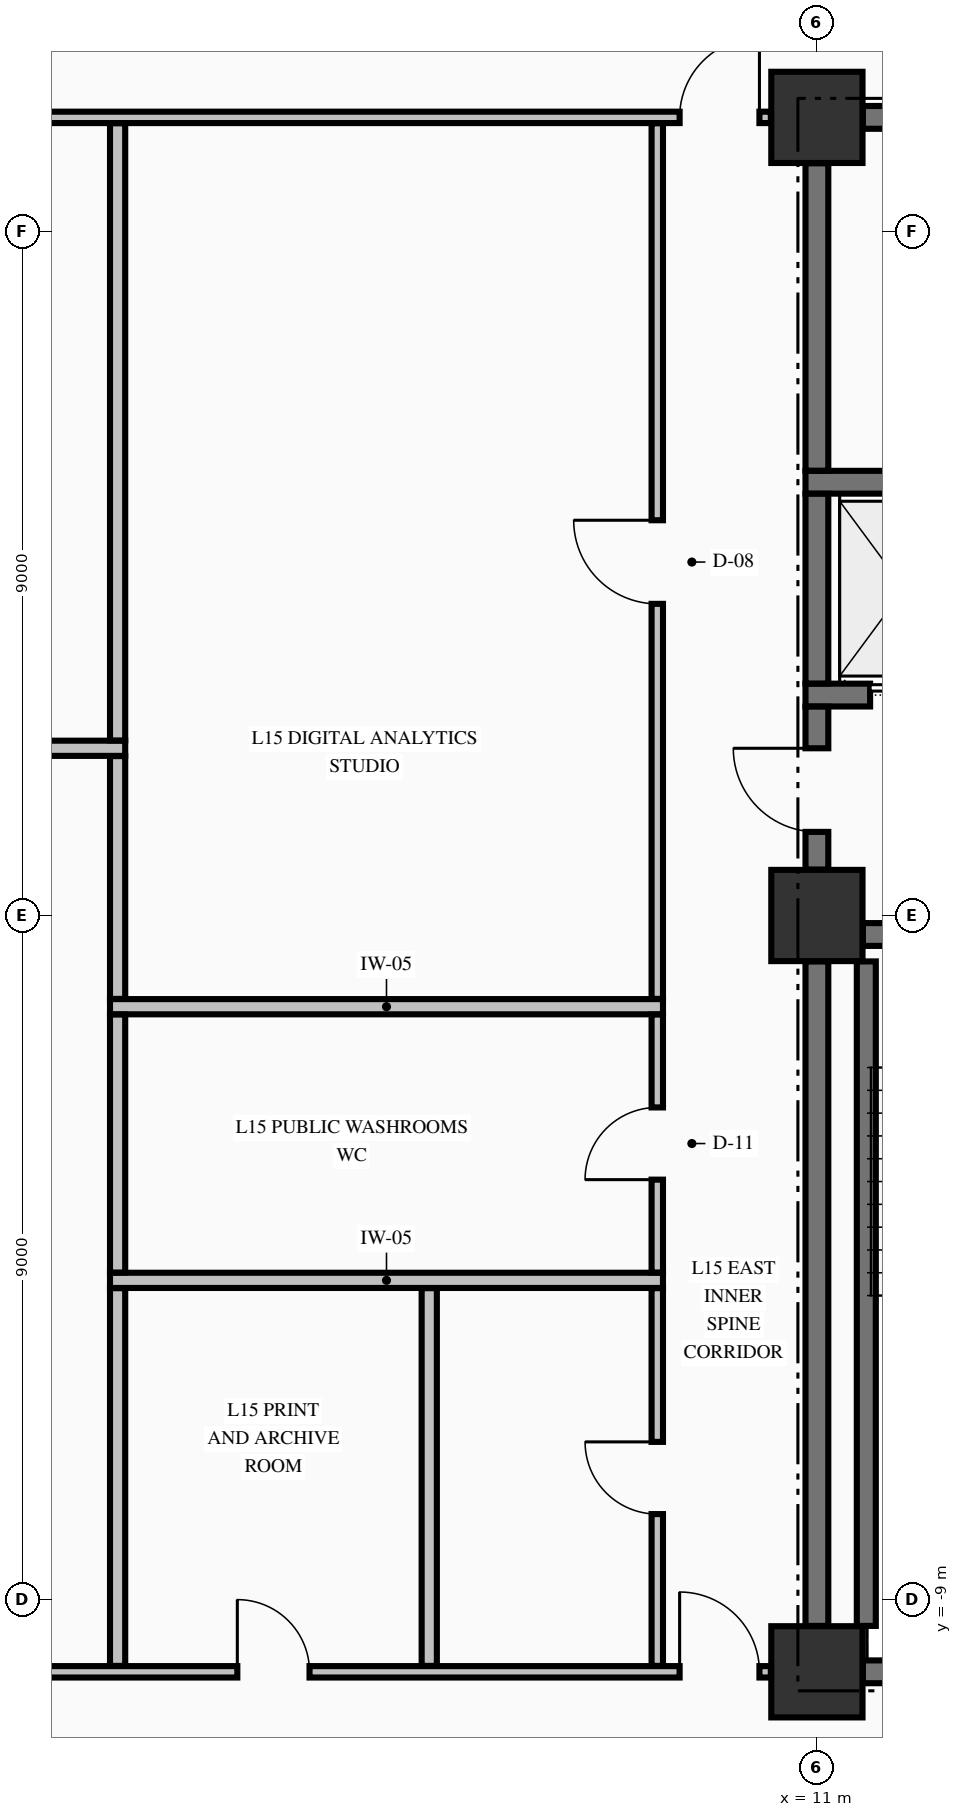
"""IFC4 building model, lengths in metres.
Left out: names, types, materials, properties, quantities, classifications, styles, units other than length and angle.
Written with IfcOpenShell. Run it as: python <this file> out.ifc"""

import sys

from ifc_helpers import new_model, si_unit, direction, frame, frame_2d, origin, origin_2d, place, context, subcontext, project, spatial, rectangle, extrude, element, fill, save


model = new_model("IFC4")
c1 = context("Model", 3, precision=1e-05, world=origin(), true_north=direction((0.0, 1.0)))
c2 = subcontext(c1, "Body", "Model", "MODEL_VIEW")
j1 = project(units=[si_unit("LENGTHUNIT", "METRE"), si_unit("PLANEANGLEUNIT", "RADIAN")], contexts=[c1])
p1 = place(None, origin())
s1 = spatial("IfcSite", under=j1, at=p1, CompositionType="ELEMENT")
p2 = place(p1, origin())
s2 = spatial("IfcBuilding", under=s1, at=p2, CompositionType="ELEMENT")
p3 = place(p2, frame((0.0, 0.0, 64.33)))
s3 = spatial("IfcBuildingStorey", under=s2, at=p3, CompositionType="ELEMENT", Elevation=64.33)
for number, where, z_axis, x_axis in (
    (1, (11.0, -9.95, -0.25), (0.0, 0.0, 1.0), (1.0, 0.0, 0.0)),
    (2, (11.0, 0.0, -0.25), (0.0, 0.0, 1.0), (1.0, 0.0, 0.0)),
    (3, (11.0, 10.5, -0.25), (0.0, 0.0, 1.0), (1.0, 0.0, 0.0)),
):
    element("IfcColumn", number, at=place(p3, frame(where, z_axis=z_axis, x_axis=x_axis)), inside=s3, PredefinedType="COLUMN", context=c2, shape_type="SweptSolid", body=[
        extrude(rectangle(XDim=1.2, YDim=1.2, at=origin_2d()), origin(), (0.0, 0.0, 1.0), 3.57),
    ])
p4 = place(p3, frame((11.604, -9.95, 0.0), z_axis=(0.0, 0.0, 1.0), x_axis=(1.0, 0.0, 0.0)))
e4 = element("IfcWall", 4, at=p4, inside=s3, PredefinedType="SHEAR", context=c2, shape_type="SweptSolid", body=[
    extrude(rectangle(XDim=3.096, YDim=0.3, at=frame_2d((1.548, 0.0))), origin(), (0.0, 0.0, 1.0), 3.32),
])
p5 = place(p3, frame((11.604, -0.25, 0.0), z_axis=(0.0, 0.0, 1.0), x_axis=(1.0, 0.0, 0.0)))
e5 = element("IfcWall", 5, at=p5, inside=s3, PredefinedType="SHEAR", context=c2, shape_type="SweptSolid", body=[
    extrude(rectangle(XDim=3.271, YDim=0.3, at=frame_2d((1.635, 0.0))), origin(), (0.0, 0.0, 1.0), 3.32),
])
p6 = place(p5, frame((0.996, 0.0, 0.0)))
e6 = element("IfcOpeningElement", 6, at=p6, cuts=e5, PredefinedType="OPENING", context=c2, shape_type="SweptSolid", body=[
    extrude(rectangle(XDim=1.1, YDim=2.15, at=frame_2d((0.55, 1.075))), frame((0.0, 0.16, 0.0), z_axis=(0.0, -1.0, 0.0), x_axis=(1.0, 0.0, 0.0)), (0.0, 0.0, 1.0), 0.32),
])
p7 = place(p3, frame((10.85, 2.9, 0.0), z_axis=(0.0, 0.0, 1.0), x_axis=(1.0, 0.0, 0.0)))
e7 = element("IfcWall", 7, at=p7, inside=s3, PredefinedType="SHEAR", context=c2, shape_type="SweptSolid", body=[
    extrude(rectangle(XDim=4.025, YDim=0.3, at=frame_2d((2.012, 0.0))), origin(), (0.0, 0.0, 1.0), 3.32),
])
p8 = place(p7, frame((0.85, 0.0, 0.0)))
e8 = element("IfcOpeningElement", 8, at=p8, cuts=e7, PredefinedType="OPENING", context=c2, shape_type="SweptSolid", body=[
    extrude(rectangle(XDim=1.1, YDim=2.2, at=frame_2d((0.55, 1.1))), frame((0.0, 0.16, 0.0), z_axis=(0.0, -1.0, 0.0), x_axis=(1.0, 0.0, 0.0)), (0.0, 0.0, 1.0), 0.32),
])
p9 = place(p3, frame((10.85, 5.7, 0.0), z_axis=(0.0, 0.0, 1.0), x_axis=(1.0, 0.0, 0.0)))
e9 = element("IfcWall", 9, at=p9, inside=s3, PredefinedType="SHEAR", context=c2, shape_type="SweptSolid", body=[
    extrude(rectangle(XDim=4.025, YDim=0.3, at=frame_2d((2.012, 0.0))), origin(), (0.0, 0.0, 1.0), 3.32),
])
p10 = place(p3, frame((11.604, 10.5, 0.0), z_axis=(0.0, 0.0, 1.0), x_axis=(1.0, 0.0, 0.0)))
e10 = element("IfcWall", 10, at=p10, inside=s3, PredefinedType="SHEAR", context=c2, shape_type="SweptSolid", body=[
    extrude(rectangle(XDim=3.096, YDim=0.3, at=frame_2d((1.548, 0.0))), origin(), (0.0, 0.0, 1.0), 3.32),
])
p11 = place(p10, frame((1.371, 0.0, 0.0)))
e11 = element("IfcOpeningElement", 11, at=p11, cuts=e10, PredefinedType="OPENING", context=c2, shape_type="SweptSolid", body=[
    extrude(rectangle(XDim=0.95, YDim=2.15, at=frame_2d((0.475, 1.075))), frame((0.0, 0.16, 0.0), z_axis=(0.0, -1.0, 0.0), x_axis=(1.0, 0.0, 0.0)), (0.0, 0.0, 1.0), 0.32),
])
p12 = place(p3, frame((-10.394, -9.95, 0.0), z_axis=(0.0, 0.0, 1.0), x_axis=(1.0, 0.0, 0.0)))
e12 = element("IfcWall", 12, at=p12, inside=s3, PredefinedType="PARTITIONING", context=c2, shape_type="SweptSolid", body=[
    extrude(rectangle(XDim=20.788, YDim=0.15, at=frame_2d((10.394, 0.0))), origin(), (0.0, 0.0, 1.0), 3.32),
])
p13 = place(p12, frame((0.15, 0.0, 0.0)))
e13 = element("IfcOpeningElement", 13, at=p13, cuts=e12, PredefinedType="OPENING", context=c2, shape_type="SweptSolid", body=[
    extrude(rectangle(XDim=1.05, YDim=2.15, at=frame_2d((0.525, 1.075))), frame((0.0, 0.085, 0.0), z_axis=(0.0, -1.0, 0.0), x_axis=(1.0, 0.0, 0.0)), (0.0, 0.0, 1.0), 0.17),
])
p14 = place(p12, frame((19.588, 0.0, 0.0)))
e14 = element("IfcOpeningElement", 14, at=p14, cuts=e12, PredefinedType="OPENING", context=c2, shape_type="SweptSolid", body=[
    extrude(rectangle(XDim=1.05, YDim=2.15, at=frame_2d((0.525, 1.075))), frame((0.0, 0.085, 0.0), z_axis=(0.0, -1.0, 0.0), x_axis=(1.0, 0.0, 0.0)), (0.0, 0.0, 1.0), 0.17),
])
p15 = place(p12, frame((13.769, 0.0, 0.0)))
e15 = element("IfcOpeningElement", 15, at=p15, cuts=e12, PredefinedType="OPENING", context=c2, shape_type="SweptSolid", body=[
    extrude(rectangle(XDim=0.95, YDim=2.15, at=frame_2d((0.475, 1.075))), frame((0.0, 0.085, 0.0), z_axis=(0.0, -1.0, 0.0), x_axis=(1.0, 0.0, 0.0)), (0.0, 0.0, 1.0), 0.17),
])
for number, where, z_axis, x_axis in (
    (16, (1.7, -4.8, 0.0), (0.0, 0.0, 1.0), (1.0, 0.0, 0.0)),
    (17, (1.7, -1.2, 0.0), (0.0, 0.0, 1.0), (1.0, 0.0, 0.0)),
):
    element("IfcWall", number, at=place(p3, frame(where, z_axis=z_axis, x_axis=x_axis)), inside=s3, PredefinedType="PARTITIONING", context=c2, shape_type="SweptSolid", body=[
        extrude(rectangle(XDim=7.275, YDim=0.2, at=frame_2d((3.638, 0.0))), origin(), (0.0, 0.0, 1.0), 3.32),
    ])
p16 = place(p3, frame((-8.975, 2.2, 0.0), z_axis=(0.0, 0.0, 1.0), x_axis=(1.0, 0.0, 0.0)))
e18 = element("IfcWall", 18, at=p16, inside=s3, PredefinedType="PARTITIONING", context=c2, shape_type="SweptSolid", body=[
    extrude(rectangle(XDim=10.875, YDim=0.2, at=frame_2d((5.438, 0.0))), origin(), (0.0, 0.0, 1.0), 3.32),
])
p17 = place(p3, frame((-10.394, 10.5, 0.0), z_axis=(0.0, 0.0, 1.0), x_axis=(1.0, 0.0, 0.0)))
e19 = element("IfcWall", 19, at=p17, inside=s3, PredefinedType="PARTITIONING", context=c2, shape_type="SweptSolid", body=[
    extrude(rectangle(XDim=20.788, YDim=0.15, at=frame_2d((10.394, 0.0))), origin(), (0.0, 0.0, 1.0), 3.32),
])
p18 = place(p17, frame((0.15, 0.0, 0.0)))
e20 = element("IfcOpeningElement", 20, at=p18, cuts=e19, PredefinedType="OPENING", context=c2, shape_type="SweptSolid", body=[
    extrude(rectangle(XDim=1.05, YDim=2.15, at=frame_2d((0.525, 1.075))), frame((0.0, 0.085, 0.0), z_axis=(0.0, -1.0, 0.0), x_axis=(1.0, 0.0, 0.0)), (0.0, 0.0, 1.0), 0.17),
])
p19 = place(p17, frame((19.588, 0.0, 0.0)))
e21 = element("IfcOpeningElement", 21, at=p19, cuts=e19, PredefinedType="OPENING", context=c2, shape_type="SweptSolid", body=[
    extrude(rectangle(XDim=1.05, YDim=2.15, at=frame_2d((0.525, 1.075))), frame((0.0, 0.085, 0.0), z_axis=(0.0, -1.0, 0.0), x_axis=(1.0, 0.0, 0.0)), (0.0, 0.0, 1.0), 0.17),
])
p20 = place(p3, frame((11.0, -9.346, 0.0), z_axis=(0.0, 0.0, 1.0), x_axis=(0.0, 1.0, 0.0)))
e22 = element("IfcWall", 22, at=p20, inside=s3, PredefinedType="SHEAR", context=c2, shape_type="SweptSolid", body=[
    extrude(rectangle(XDim=8.742, YDim=0.3, at=frame_2d((4.371, 0.0))), origin(), (0.0, 0.0, 1.0), 3.32),
])
p21 = place(p3, frame((11.0, 0.604, 0.0), z_axis=(0.0, 0.0, 1.0), x_axis=(0.0, 1.0, 0.0)))
e23 = element("IfcWall", 23, at=p21, inside=s3, PredefinedType="SHEAR", context=c2, shape_type="SweptSolid", body=[
    extrude(rectangle(XDim=2.144, YDim=0.3, at=frame_2d((1.072, 0.0))), origin(), (0.0, 0.0, 1.0), 3.32),
])
p22 = place(p21, frame((0.496, 0.0, 0.0)))
e24 = element("IfcOpeningElement", 24, at=p22, cuts=e23, PredefinedType="OPENING", context=c2, shape_type="SweptSolid", body=[
    extrude(rectangle(XDim=1.1, YDim=2.15, at=frame_2d((0.55, 1.075))), frame((0.0, 0.16, 0.0), z_axis=(0.0, -1.0, 0.0), x_axis=(1.0, 0.0, 0.0)), (0.0, 0.0, 1.0), 0.32),
])
p23 = place(p3, frame((11.0, 3.052, 0.0), z_axis=(0.0, 0.0, 1.0), x_axis=(0.0, 1.0, 0.0)))
e25 = element("IfcWall", 25, at=p23, inside=s3, PredefinedType="SHEAR", context=c2, shape_type="SweptSolid", body=[
    extrude(rectangle(XDim=2.496, YDim=0.3, at=frame_2d((1.248, 0.0))), origin(), (0.0, 0.0, 1.0), 3.32),
])
p24 = place(p3, frame((11.0, 5.852, 0.0), z_axis=(0.0, 0.0, 1.0), x_axis=(0.0, 1.0, 0.0)))
e26 = element("IfcWall", 26, at=p24, inside=s3, PredefinedType="SHEAR", context=c2, shape_type="SweptSolid", body=[
    extrude(rectangle(XDim=4.044, YDim=0.3, at=frame_2d((2.022, 0.0))), origin(), (0.0, 0.0, 1.0), 3.32),
])
p25 = place(p3, frame((11.65, -9.346, 0.0), z_axis=(0.0, 0.0, 1.0), x_axis=(0.0, 1.0, 0.0)))
e27 = element("IfcWall", 27, at=p25, inside=s3, PredefinedType="SOLIDWALL", context=c2, shape_type="SweptSolid", body=[
    extrude(rectangle(XDim=8.742, YDim=0.25, at=frame_2d((4.371, 0.0))), origin(), (0.0, 0.0, 1.0), 3.32),
])
p26 = place(p3, frame((1.8, -9.872, 0.0), z_axis=(0.0, 0.0, 1.0), x_axis=(0.0, 1.0, 0.0)))
e28 = element("IfcWall", 28, at=p26, inside=s3, PredefinedType="PARTITIONING", context=c2, shape_type="SweptSolid", body=[
    extrude(rectangle(XDim=4.969, YDim=0.2, at=frame_2d((2.484, 0.0))), origin(), (0.0, 0.0, 1.0), 3.32),
])
p27 = place(p3, frame((1.8, -4.697, 0.0), z_axis=(0.0, 0.0, 1.0), x_axis=(0.0, 1.0, 0.0)))
e29 = element("IfcWall", 29, at=p27, inside=s3, PredefinedType="PARTITIONING", context=c2, shape_type="SweptSolid", body=[
    extrude(rectangle(XDim=3.394, YDim=0.2, at=frame_2d((1.697, 0.0))), origin(), (0.0, 0.0, 1.0), 3.32),
])
p28 = place(p3, frame((1.8, -1.097, 0.0), z_axis=(0.0, 0.0, 1.0), x_axis=(0.0, 1.0, 0.0)))
e30 = element("IfcWall", 30, at=p28, inside=s3, PredefinedType="PARTITIONING", context=c2, shape_type="SweptSolid", body=[
    extrude(rectangle(XDim=3.194, YDim=0.2, at=frame_2d((1.597, 0.0))), origin(), (0.0, 0.0, 1.0), 3.32),
])
p29 = place(p3, frame((1.8, 2.303, 0.0), z_axis=(0.0, 0.0, 1.0), x_axis=(0.0, 1.0, 0.0)))
e31 = element("IfcWall", 31, at=p29, inside=s3, PredefinedType="PARTITIONING", context=c2, shape_type="SweptSolid", body=[
    extrude(rectangle(XDim=8.119, YDim=0.2, at=frame_2d((4.06, 0.0))), origin(), (0.0, 0.0, 1.0), 3.32),
])
p30 = place(p3, frame((5.9, -9.872, 0.0), z_axis=(0.0, 0.0, 1.0), x_axis=(0.0, 1.0, 0.0)))
e32 = element("IfcWall", 32, at=p30, inside=s3, PredefinedType="PARTITIONING", context=c2, shape_type="SweptSolid", body=[
    extrude(rectangle(XDim=4.969, YDim=0.2, at=frame_2d((2.484, 0.0))), origin(), (0.0, 0.0, 1.0), 3.32),
])
p31 = place(p3, frame((8.9, -9.872, 0.0), z_axis=(0.0, 0.0, 1.0), x_axis=(0.0, 1.0, 0.0)))
e33 = element("IfcWall", 33, at=p31, inside=s3, PredefinedType="PARTITIONING", context=c2, shape_type="SweptSolid", body=[
    extrude(rectangle(XDim=4.969, YDim=0.15, at=frame_2d((2.484, 0.0))), origin(), (0.0, 0.0, 1.0), 3.32),
])
p32 = place(p31, frame((1.997, 0.0, 0.0)))
e34 = element("IfcOpeningElement", 34, at=p32, cuts=e33, PredefinedType="OPENING", context=c2, shape_type="SweptSolid", body=[
    extrude(rectangle(XDim=0.95, YDim=2.15, at=frame_2d((0.475, 1.075))), frame((0.0, 0.085, 0.0), z_axis=(0.0, -1.0, 0.0), x_axis=(1.0, 0.0, 0.0)), (0.0, 0.0, 1.0), 0.17),
])
p33 = place(p3, frame((8.9, -4.697, 0.0), z_axis=(0.0, 0.0, 1.0), x_axis=(0.0, 1.0, 0.0)))
e35 = element("IfcWall", 35, at=p33, inside=s3, PredefinedType="PARTITIONING", context=c2, shape_type="SweptSolid", body=[
    extrude(rectangle(XDim=3.394, YDim=0.15, at=frame_2d((1.697, 0.0))), origin(), (0.0, 0.0, 1.0), 3.32),
])
p34 = place(p33, frame((1.222, 0.0, 0.0)))
e36 = element("IfcOpeningElement", 36, at=p34, cuts=e35, PredefinedType="OPENING", context=c2, shape_type="SweptSolid", body=[
    extrude(rectangle(XDim=0.95, YDim=2.15, at=frame_2d((0.475, 1.075))), frame((0.0, 0.085, 0.0), z_axis=(0.0, -1.0, 0.0), x_axis=(1.0, 0.0, 0.0)), (0.0, 0.0, 1.0), 0.17),
])
p35 = place(p3, frame((8.9, -1.097, 0.0), z_axis=(0.0, 0.0, 1.0), x_axis=(0.0, 1.0, 0.0)))
e37 = element("IfcWall", 37, at=p35, inside=s3, PredefinedType="PARTITIONING", context=c2, shape_type="SweptSolid", body=[
    extrude(rectangle(XDim=11.519, YDim=0.15, at=frame_2d((5.76, 0.0))), origin(), (0.0, 0.0, 1.0), 3.32),
])
p36 = place(p35, frame((5.197, 0.0, 0.0)))
e38 = element("IfcOpeningElement", 38, at=p36, cuts=e37, PredefinedType="OPENING", context=c2, shape_type="SweptSolid", body=[
    extrude(rectangle(XDim=1.1, YDim=2.15, at=frame_2d((0.55, 1.075))), frame((0.0, 0.085, 0.0), z_axis=(0.0, -1.0, 0.0), x_axis=(1.0, 0.0, 0.0)), (0.0, 0.0, 1.0), 0.17),
])
p37 = place(p22, origin())
e39 = element("IfcDoor", 39, at=p37, inside=s3, OperationType="SINGLE_SWING_RIGHT", PredefinedType="DOOR", context=c2, shape_type="SweptSolid", body=[
    extrude(rectangle(XDim=1.1, YDim=2.15, at=frame_2d((0.55, 1.075))), frame((0.0, 0.025, 0.0), z_axis=(0.0, -1.0, 0.0), x_axis=(1.0, 0.0, 0.0)), (0.0, 0.0, 1.0), 0.05),
])
fill(e24, e39)
p38 = place(p8, origin())
e40 = element("IfcDoor", 40, at=p38, inside=s3, OperationType="SLIDING_TO_RIGHT", PredefinedType="DOOR", context=c2, shape_type="SweptSolid", body=[
    extrude(rectangle(XDim=1.1, YDim=2.2, at=frame_2d((0.55, 1.1))), frame((0.0, 0.025, 0.0), z_axis=(0.0, -1.0, 0.0), x_axis=(1.0, 0.0, 0.0)), (0.0, 0.0, 1.0), 0.05),
])
fill(e8, e40)
p39 = place(p19, origin())
e41 = element("IfcDoor", 41, at=p39, inside=s3, OperationType="SINGLE_SWING_RIGHT", PredefinedType="DOOR", context=c2, shape_type="SweptSolid", body=[
    extrude(rectangle(XDim=1.05, YDim=2.15, at=frame_2d((0.525, 1.075))), frame((0.0, 0.025, 0.0), z_axis=(0.0, -1.0, 0.0), x_axis=(1.0, 0.0, 0.0)), (0.0, 0.0, 1.0), 0.05),
])
fill(e21, e41)
p40 = place(p14, origin())
e42 = element("IfcDoor", 42, at=p40, inside=s3, OperationType="SINGLE_SWING_LEFT", PredefinedType="DOOR", context=c2, shape_type="SweptSolid", body=[
    extrude(rectangle(XDim=1.05, YDim=2.15, at=frame_2d((0.525, 1.075))), frame((0.0, 0.025, 0.0), z_axis=(0.0, -1.0, 0.0), x_axis=(1.0, 0.0, 0.0)), (0.0, 0.0, 1.0), 0.05),
])
fill(e14, e42)
p41 = place(p36, origin())
e43 = element("IfcDoor", 43, at=p41, inside=s3, OperationType="SINGLE_SWING_RIGHT", PredefinedType="DOOR", context=c2, shape_type="SweptSolid", body=[
    extrude(rectangle(XDim=1.1, YDim=2.15, at=frame_2d((0.55, 1.075))), frame((0.0, 0.025, 0.0), z_axis=(0.0, -1.0, 0.0), x_axis=(1.0, 0.0, 0.0)), (0.0, 0.0, 1.0), 0.05),
])
fill(e38, e43)
p42 = place(p34, origin())
e44 = element("IfcDoor", 44, at=p42, inside=s3, OperationType="SINGLE_SWING_LEFT", PredefinedType="DOOR", context=c2, shape_type="SweptSolid", body=[
    extrude(rectangle(XDim=0.95, YDim=2.15, at=frame_2d((0.475, 1.075))), frame((0.0, 0.025, 0.0), z_axis=(0.0, -1.0, 0.0), x_axis=(1.0, 0.0, 0.0)), (0.0, 0.0, 1.0), 0.05),
])
fill(e36, e44)
p43 = place(p32, origin())
e45 = element("IfcDoor", 45, at=p43, inside=s3, OperationType="SINGLE_SWING_RIGHT", PredefinedType="DOOR", context=c2, shape_type="SweptSolid", body=[
    extrude(rectangle(XDim=0.95, YDim=2.15, at=frame_2d((0.475, 1.075))), frame((0.0, 0.025, 0.0), z_axis=(0.0, -1.0, 0.0), x_axis=(1.0, 0.0, 0.0)), (0.0, 0.0, 1.0), 0.05),
])
fill(e34, e45)
p44 = place(p15, origin())
e46 = element("IfcDoor", 46, at=p44, inside=s3, OperationType="SINGLE_SWING_LEFT", PredefinedType="DOOR", context=c2, shape_type="SweptSolid", body=[
    extrude(rectangle(XDim=0.95, YDim=2.15, at=frame_2d((0.475, 1.075))), frame((0.0, 0.025, 0.0), z_axis=(0.0, -1.0, 0.0), x_axis=(1.0, 0.0, 0.0)), (0.0, 0.0, 1.0), 0.05),
])
fill(e15, e46)
save(model, sys.argv[1])
